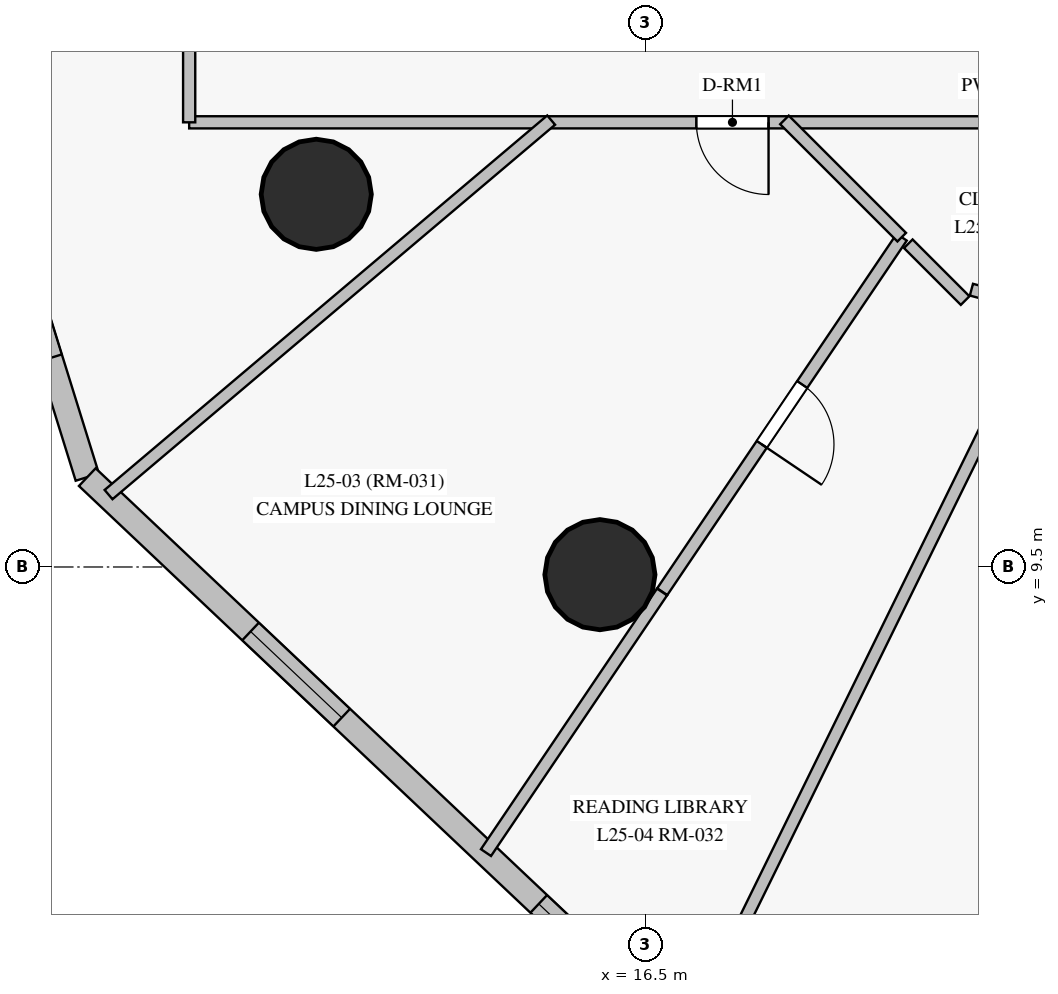
"""IFC4 building model, lengths in metres.
Left out: names, types, materials, properties, quantities, classifications, styles, units other than length and angle.
Written with IfcOpenShell. Run it as: python <this file> out.ifc"""

import sys

from ifc_helpers import new_model, si_unit, direction, frame, frame_2d, origin, origin_with_axes, origin_2d, place, context, subcontext, project, spatial, rectangle, circle, extrude, source, transform, mapped, element, fill, save


model = new_model("IFC4")
c1 = context("Model", 3, precision=1e-05, world=origin(), true_north=direction((0.0, 1.0)))
c2 = subcontext(c1, "Body", "Model", "MODEL_VIEW")
j1 = project(units=[si_unit("LENGTHUNIT", "METRE"), si_unit("PLANEANGLEUNIT", "RADIAN")], contexts=[c1])
p1 = place(None, origin())
s1 = spatial("IfcSite", under=j1, at=p1, CompositionType="ELEMENT")
p2 = place(p1, origin())
s2 = spatial("IfcBuilding", under=s1, at=p2, CompositionType="ELEMENT")
p3 = place(p2, frame((0.0, 0.0, 96.2)))
s3 = spatial("IfcBuildingStorey", under=s2, at=p3, CompositionType="ELEMENT", Elevation=96.2)
m1 = source(origin_with_axes(), c2, "Body", "SweptSolid", [
    extrude(circle(Radius=0.725, at=origin_2d()), origin(), (0.0, 0.0, 1.0), 3.05),
])
for number, where, z_axis, x_axis in (
    (1, (12.172, 14.403, 0.0), (0.0, 0.0, 1.0), (1.0, 0.0, 0.0)),
    (2, (15.904, 9.399, 0.0), (0.0, 0.0, 1.0), (1.0, 0.0, 0.0)),
):
    element("IfcColumn", number, at=place(p3, frame(where, z_axis=z_axis, x_axis=x_axis)), inside=s3, PredefinedType="COLUMN", context=c2, shape_type="MappedRepresentation", body=[
        mapped(m1, transform((0.0, 0.0, 0.0), scale=1.0)),
    ])
p4 = place(p3, frame((6.183, 20.25, 0.0), z_axis=(0.0, 0.0, 1.0), x_axis=(0.297070502101, -0.954855547599, 0.0)))
e3 = element("IfcWall", 3, at=p4, inside=s3, PredefinedType="SOLIDWALL", context=c2, shape_type="SweptSolid", body=[
    extrude(rectangle(XDim=10.02, YDim=0.32, at=frame_2d((5.01, 0.0))), origin(), (0.0, 0.0, 1.0), 2.825),
])
p5 = place(p4, frame((2.556, 0.0, 0.85)))
e4 = element("IfcOpeningElement", 4, at=p5, cuts=e3, PredefinedType="OPENING", context=c2, shape_type="SweptSolid", body=[
    extrude(rectangle(XDim=1.65, YDim=1.65, at=frame_2d((0.825, 0.825))), frame((0.0, 0.17, 0.0), z_axis=(0.0, -1.0, 0.0), x_axis=(1.0, 0.0, 0.0)), (0.0, 0.0, 1.0), 0.34),
])
p6 = place(p4, frame((6.729, 0.0, 0.85)))
e5 = element("IfcOpeningElement", 5, at=p6, cuts=e3, PredefinedType="OPENING", context=c2, shape_type="SweptSolid", body=[
    extrude(rectangle(XDim=1.65, YDim=1.65, at=frame_2d((0.825, 0.825))), frame((0.0, 0.17, 0.0), z_axis=(0.0, -1.0, 0.0), x_axis=(1.0, 0.0, 0.0)), (0.0, 0.0, 1.0), 0.34),
])
p7 = place(p3, frame((9.16, 10.682, 0.0), z_axis=(0.0, 0.0, 1.0), x_axis=(0.726725897384, -0.686927558096, 0.0)))
e6 = element("IfcWall", 6, at=p7, inside=s3, PredefinedType="SOLIDWALL", context=c2, shape_type="SweptSolid", body=[
    extrude(rectangle(XDim=12.471, YDim=0.32, at=frame_2d((6.236, 0.0))), origin(), (0.0, 0.0, 1.0), 2.825),
])
p8 = place(p7, frame((2.956, 0.0, 0.85)))
e7 = element("IfcOpeningElement", 7, at=p8, cuts=e6, PredefinedType="OPENING", context=c2, shape_type="SweptSolid", body=[
    extrude(rectangle(XDim=1.65, YDim=1.65, at=frame_2d((0.825, 0.825))), frame((0.0, 0.17, 0.0), z_axis=(0.0, -1.0, 0.0), x_axis=(1.0, 0.0, 0.0)), (0.0, 0.0, 1.0), 0.34),
])
p9 = place(p7, frame((8.173, 0.0, 0.85)))
e8 = element("IfcOpeningElement", 8, at=p9, cuts=e6, PredefinedType="OPENING", context=c2, shape_type="SweptSolid", body=[
    extrude(rectangle(XDim=1.65, YDim=1.65, at=frame_2d((0.825, 0.825))), frame((0.0, 0.17, 0.0), z_axis=(0.0, -1.0, 0.0), x_axis=(1.0, 0.0, 0.0)), (0.0, 0.0, 1.0), 0.34),
])
p10 = place(p3, frame((40.25, 15.35, 0.0), z_axis=(0.0, 0.0, 1.0), x_axis=(-1.0, 0.0, 0.0)))
e9 = element("IfcWall", 9, at=p10, inside=s3, PredefinedType="PARTITIONING", context=c2, shape_type="SweptSolid", body=[
    extrude(rectangle(XDim=29.75, YDim=0.16, at=frame_2d((14.875, 0.0))), origin(), (0.0, 0.0, 1.0), 2.225),
])
p11 = place(p10, frame((22.127, 0.0, 0.0)))
e10 = element("IfcOpeningElement", 10, at=p11, cuts=e9, PredefinedType="OPENING", context=c2, shape_type="SweptSolid", body=[
    extrude(rectangle(XDim=0.95, YDim=2.15, at=frame_2d((0.475, 1.075))), frame((0.0, 0.09, 0.0), z_axis=(0.0, -1.0, 0.0), x_axis=(1.0, 0.0, 0.0)), (0.0, 0.0, 1.0), 0.18),
])
p12 = place(p10, frame((14.4, 0.0, 0.0)))
e11 = element("IfcOpeningElement", 11, at=p12, cuts=e9, PredefinedType="OPENING", context=c2, shape_type="SweptSolid", body=[
    extrude(rectangle(XDim=0.96, YDim=2.15, at=frame_2d((0.48, 1.075))), frame((0.0, 0.09, 0.0), z_axis=(0.0, -1.0, 0.0), x_axis=(1.0, 0.0, 0.0)), (0.0, 0.0, 1.0), 0.18),
])
p13 = place(p10, frame((10.127, 0.0, 0.0)))
e12 = element("IfcOpeningElement", 12, at=p13, cuts=e9, PredefinedType="OPENING", context=c2, shape_type="SweptSolid", body=[
    extrude(rectangle(XDim=0.96, YDim=2.15, at=frame_2d((0.48, 1.075))), frame((0.0, 0.09, 0.0), z_axis=(0.0, -1.0, 0.0), x_axis=(1.0, 0.0, 0.0)), (0.0, 0.0, 1.0), 0.18),
])
p14 = place(p10, frame((8.158, 0.0, 0.0)))
e13 = element("IfcOpeningElement", 13, at=p14, cuts=e9, PredefinedType="OPENING", context=c2, shape_type="SweptSolid", body=[
    extrude(rectangle(XDim=0.95, YDim=2.15, at=frame_2d((0.475, 1.075))), frame((0.0, 0.09, 0.0), z_axis=(0.0, -1.0, 0.0), x_axis=(1.0, 0.0, 0.0)), (0.0, 0.0, 1.0), 0.18),
])
p15 = place(p10, frame((3.353, 0.0, 0.0)))
e14 = element("IfcOpeningElement", 14, at=p15, cuts=e9, PredefinedType="OPENING", context=c2, shape_type="SweptSolid", body=[
    extrude(rectangle(XDim=0.96, YDim=2.15, at=frame_2d((0.48, 1.075))), frame((0.0, 0.09, 0.0), z_axis=(0.0, -1.0, 0.0), x_axis=(1.0, 0.0, 0.0)), (0.0, 0.0, 1.0), 0.18),
])
p16 = place(p3, frame((10.5, 15.35, 0.0), z_axis=(0.0, 0.0, 1.0), x_axis=(0.0, 1.0, 0.0)))
e15 = element("IfcWall", 15, at=p16, inside=s3, PredefinedType="PARTITIONING", context=c2, shape_type="SweptSolid", body=[
    extrude(rectangle(XDim=16.394, YDim=0.16, at=frame_2d((8.197, 0.0))), origin(), (0.0, 0.0, 1.0), 2.825),
])
p17 = place(p16, frame((7.648, 0.0, 0.0)))
e16 = element("IfcOpeningElement", 16, at=p17, cuts=e15, PredefinedType="OPENING", context=c2, shape_type="SweptSolid", body=[
    extrude(rectangle(XDim=0.95, YDim=2.15, at=frame_2d((0.475, 1.075))), frame((0.0, 0.09, 0.0), z_axis=(0.0, -1.0, 0.0), x_axis=(1.0, 0.0, 0.0)), (0.0, 0.0, 1.0), 0.18),
])
p18 = place(p16, frame((3.586, 0.0, 0.0)))
e17 = element("IfcOpeningElement", 17, at=p18, cuts=e15, PredefinedType="OPENING", context=c2, shape_type="SweptSolid", body=[
    extrude(rectangle(XDim=0.96, YDim=2.15, at=frame_2d((0.48, 1.075))), frame((0.0, 0.09, 0.0), z_axis=(0.0, -1.0, 0.0), x_axis=(1.0, 0.0, 0.0)), (0.0, 0.0, 1.0), 0.18),
])
p19 = place(p3, frame((21.681, 12.744, 0.0), z_axis=(0.0, 0.0, 1.0), x_axis=(-0.440627063777, -0.897690253187, 0.0)))
e18 = element("IfcWall", 18, at=p19, inside=s3, PredefinedType="PARTITIONING", context=c2, shape_type="SweptSolid", body=[
    extrude(rectangle(XDim=10.546, YDim=0.16, at=frame_2d((5.273, 0.0))), origin(), (0.0, 0.0, 1.0), 2.825),
])
p20 = place(p3, frame((24.026, 12.116, 0.0), z_axis=(0.0, 0.0, 1.0), x_axis=(-0.293181178855, -0.956056900171, 0.0)))
e19 = element("IfcWall", 19, at=p20, inside=s3, PredefinedType="PARTITIONING", context=c2, shape_type="SweptSolid", body=[
    extrude(rectangle(XDim=10.507, YDim=0.16, at=frame_2d((5.254, 0.0))), origin(), (0.0, 0.0, 1.0), 2.825),
])
p21 = place(p3, frame((15.262, 15.379, 0.0), z_axis=(0.0, 0.0, 1.0), x_axis=(-0.763411780434, -0.645912109729, 0.0)))
e20 = element("IfcWall", 20, at=p21, inside=s3, PredefinedType="PARTITIONING", context=c2, shape_type="SweptSolid", body=[
    extrude(rectangle(XDim=7.628, YDim=0.16, at=frame_2d((3.814, 0.0))), origin(), (0.0, 0.0, 1.0), 2.225),
])
p22 = place(p3, frame((27.907, 11.242, 0.0), z_axis=(0.0, 0.0, 1.0), x_axis=(-0.965920682586, 0.258838240899, 0.0)))
e21 = element("IfcWall", 21, at=p22, inside=s3, PredefinedType="PARTITIONING", context=c2, shape_type="SweptSolid", body=[
    extrude(rectangle(XDim=7.366, YDim=0.16, at=frame_2d((3.683, 0.0))), origin(), (0.0, 0.0, 1.0), 2.325),
])
p23 = place(p22, frame((4.313, 0.0, 0.0)))
e22 = element("IfcOpeningElement", 22, at=p23, cuts=e21, PredefinedType="OPENING", context=c2, shape_type="SweptSolid", body=[
    extrude(rectangle(XDim=0.96, YDim=2.15, at=frame_2d((0.48, 1.075))), frame((0.0, 0.09, 0.0), z_axis=(0.0, -1.0, 0.0), x_axis=(1.0, 0.0, 0.0)), (0.0, 0.0, 1.0), 0.18),
])
p24 = place(p22, frame((3.018, 0.0, 0.0)))
e23 = element("IfcOpeningElement", 23, at=p24, cuts=e21, PredefinedType="OPENING", context=c2, shape_type="SweptSolid", body=[
    extrude(rectangle(XDim=0.95, YDim=2.15, at=frame_2d((0.475, 1.075))), frame((0.0, 0.09, 0.0), z_axis=(0.0, -1.0, 0.0), x_axis=(1.0, 0.0, 0.0)), (0.0, 0.0, 1.0), 0.18),
])
p25 = place(p22, frame((1.763, 0.0, 0.0)))
e24 = element("IfcOpeningElement", 24, at=p25, cuts=e21, PredefinedType="OPENING", context=c2, shape_type="SweptSolid", body=[
    extrude(rectangle(XDim=0.96, YDim=2.15, at=frame_2d((0.48, 1.075))), frame((0.0, 0.09, 0.0), z_axis=(0.0, -1.0, 0.0), x_axis=(1.0, 0.0, 0.0)), (0.0, 0.0, 1.0), 0.18),
])
p26 = place(p3, frame((19.875, 13.839, 0.0), z_axis=(0.0, 0.0, 1.0), x_axis=(-0.559775304188, -0.82864444053, 0.0)))
e25 = element("IfcWall", 25, at=p26, inside=s3, PredefinedType="PARTITIONING", context=c2, shape_type="SweptSolid", body=[
    extrude(rectangle(XDim=5.628, YDim=0.16, at=frame_2d((2.814, 0.0))), origin(), (0.0, 0.0, 1.0), 2.825),
])
p27 = place(p26, frame((2.339, 0.0, 0.0)))
e26 = element("IfcOpeningElement", 26, at=p27, cuts=e25, PredefinedType="OPENING", context=c2, shape_type="SweptSolid", body=[
    extrude(rectangle(XDim=0.95, YDim=2.15, at=frame_2d((0.475, 1.075))), frame((0.0, 0.09, 0.0), z_axis=(0.0, -1.0, 0.0), x_axis=(1.0, 0.0, 0.0)), (0.0, 0.0, 1.0), 0.18),
])
p28 = place(p3, frame((16.721, 9.171, 0.0), z_axis=(0.0, 0.0, 1.0), x_axis=(-0.559768724879, -0.828648885022, 0.0)))
e27 = element("IfcWall", 27, at=p28, inside=s3, PredefinedType="PARTITIONING", context=c2, shape_type="SweptSolid", body=[
    extrude(rectangle(XDim=4.138, YDim=0.16, at=frame_2d((2.069, 0.0))), origin(), (0.0, 0.0, 1.0), 2.825),
])
p29 = place(p3, frame((18.332, 15.382, 0.0), z_axis=(0.0, 0.0, 1.0), x_axis=(0.707050832555, -0.707162725391, 0.0)))
e28 = element("IfcWall", 28, at=p29, inside=s3, PredefinedType="PARTITIONING", context=c2, shape_type="SweptSolid", body=[
    extrude(rectangle(XDim=2.182, YDim=0.16, at=frame_2d((1.091, 0.0))), origin(), (0.0, 0.0, 1.0), 2.325),
])
p30 = place(p3, frame((19.961, 13.752, 0.0), z_axis=(0.0, 0.0, 1.0), x_axis=(0.707106781187, -0.707106781187, 0.0)))
e29 = element("IfcWall", 29, at=p30, inside=s3, PredefinedType="PARTITIONING", context=c2, shape_type="SweptSolid", body=[
    extrude(rectangle(XDim=1.057, YDim=0.16, at=frame_2d((0.529, 0.0))), origin(), (0.0, 0.0, 1.0), 2.325),
])
m2 = source(origin_with_axes(), c2, "Body", "SweptSolid", [
    extrude(rectangle(XDim=1.65, YDim=1.65, at=frame_2d((0.825, 0.825))), frame((0.0, 0.03, 0.0), z_axis=(0.0, -1.0, 0.0), x_axis=(1.0, 0.0, 0.0)), (0.0, 0.0, 1.0), 0.06),
])
p31 = place(p6, origin())
e30 = element("IfcWindow", 30, at=p31, inside=s3, PartitioningType="SINGLE_PANEL", PredefinedType="WINDOW", context=c2, shape_type="MappedRepresentation", body=[
    mapped(m2, transform((0.0, 0.0, 0.0), scale=1.0)),
])
fill(e5, e30)
p32 = place(p8, origin())
e31 = element("IfcWindow", 31, at=p32, inside=s3, PartitioningType="SINGLE_PANEL", PredefinedType="WINDOW", context=c2, shape_type="MappedRepresentation", body=[
    mapped(m2, transform((0.0, 0.0, 0.0), scale=1.0)),
])
fill(e7, e31)
p33 = place(p9, origin())
e32 = element("IfcWindow", 32, at=p33, inside=s3, PartitioningType="SINGLE_PANEL", PredefinedType="WINDOW", context=c2, shape_type="MappedRepresentation", body=[
    mapped(m2, transform((0.0, 0.0, 0.0), scale=1.0)),
])
fill(e8, e32)
m3 = source(origin_with_axes(), c2, "Body", "SweptSolid", [
    extrude(rectangle(XDim=0.95, YDim=2.15, at=frame_2d((0.475, 1.075))), frame((0.0, 0.025, 0.0), z_axis=(0.0, -1.0, 0.0), x_axis=(1.0, 0.0, 0.0)), (0.0, 0.0, 1.0), 0.05),
])
p34 = place(p11, origin())
e33 = element("IfcDoor", 33, at=p34, inside=s3, OperationType="SINGLE_SWING_LEFT", PredefinedType="DOOR", context=c2, shape_type="MappedRepresentation", body=[
    mapped(m3, transform((0.0, 0.0, 0.0), scale=1.0)),
])
fill(e10, e33)
p35 = place(p27, origin())
e34 = element("IfcDoor", 34, at=p35, inside=s3, OperationType="SINGLE_SWING_RIGHT", PredefinedType="DOOR", context=c2, shape_type="MappedRepresentation", body=[
    mapped(m3, transform((0.0, 0.0, 0.0), scale=1.0)),
])
fill(e26, e34)
save(model, sys.argv[1])
